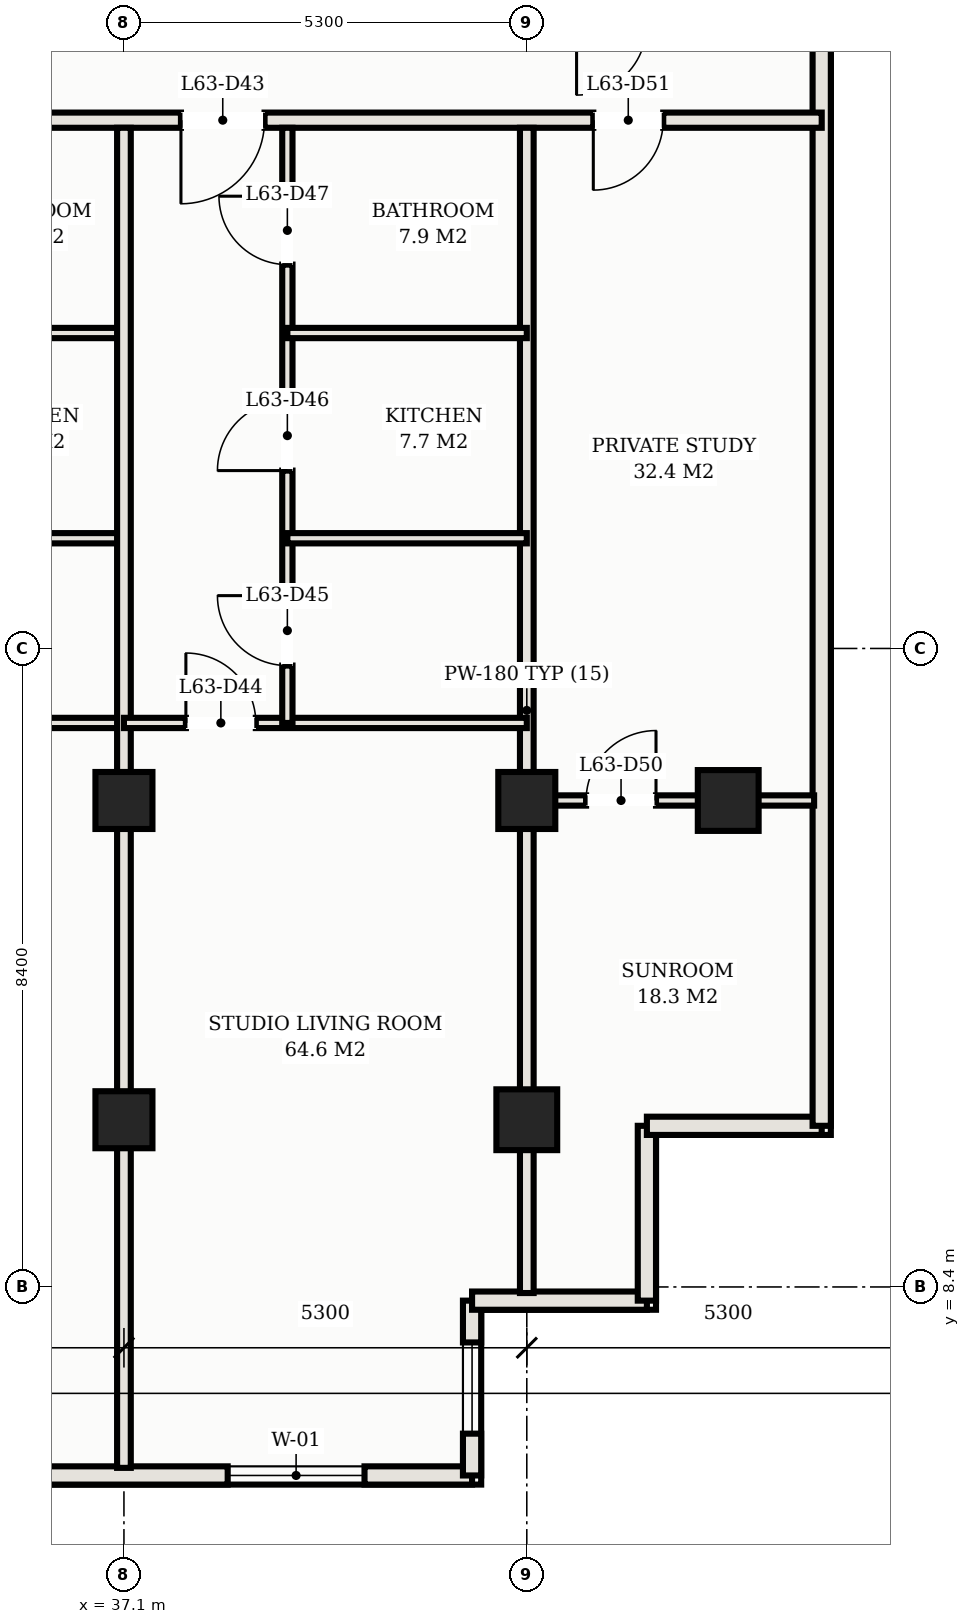
"""IFC4 building model, lengths in metres.
Left out: names, types, materials, properties, quantities, classifications, styles, units other than length and angle.
Written with IfcOpenShell. Run it as: python <this file> out.ifc"""

import sys

from ifc_helpers import new_model, si_unit, direction, frame, frame_2d, origin, origin_2d, place, context, subcontext, project, spatial, rectangle, hollow_rectangle, extrude, element, fill, save


model = new_model("IFC4")
c1 = context("Model", 3, precision=1e-05, world=origin(), true_north=direction((0.0, 1.0)))
c2 = subcontext(c1, "Body", "Model", "MODEL_VIEW")
j1 = project(units=[si_unit("LENGTHUNIT", "METRE"), si_unit("PLANEANGLEUNIT", "RADIAN")], contexts=[c1])
p1 = place(None, origin())
s1 = spatial("IfcSite", under=j1, at=p1, CompositionType="ELEMENT")
p2 = place(p1, origin())
s2 = spatial("IfcBuilding", under=s1, at=p2, CompositionType="ELEMENT")
p3 = place(p2, frame((0.0, 0.0, 229.7)))
s3 = spatial("IfcBuildingStorey", under=s2, at=p3, CompositionType="ELEMENT", Elevation=229.7)
for number, where, z_axis, x_axis in (
    (1, (37.1, 14.8, 0.0), (0.0, 0.0, 1.0), (1.0, 0.0, 0.0)),
    (2, (37.1, 10.6, 0.0), (0.0, 0.0, 1.0), (1.0, 0.0, 0.0)),
    (3, (42.4, 14.8, 0.0), (0.0, 0.0, 1.0), (1.0, 0.0, 0.0)),
):
    element("IfcColumn", number, at=place(p3, frame(where, z_axis=z_axis, x_axis=x_axis)), inside=s3, PredefinedType="COLUMN", context=c2, shape_type="SweptSolid", body=[
        extrude(hollow_rectangle(XDim=0.75, YDim=0.75, WallThickness=0.025, at=origin_2d()), origin(), (0.0, 0.0, 1.0), 3.3),
    ])
p4 = place(p3, frame((42.4, 10.6, 0.0), z_axis=(0.0, 0.0, 1.0), x_axis=(1.0, 0.0, 0.0)))
e4 = element("IfcColumn", 4, at=p4, inside=s3, PredefinedType="COLUMN", context=c2, shape_type="SweptSolid", body=[
    extrude(hollow_rectangle(XDim=0.8, YDim=0.8, WallThickness=0.028, at=origin_2d()), origin(), (0.0, 0.0, 1.0), 3.3),
])
p5 = place(p3, frame((45.05, 14.8, 0.0), z_axis=(0.0, 0.0, 1.0), x_axis=(1.0, 0.0, 0.0)))
e5 = element("IfcColumn", 5, at=p5, inside=s3, PredefinedType="COLUMN", context=c2, shape_type="SweptSolid", body=[
    extrude(hollow_rectangle(XDim=0.8, YDim=0.8, WallThickness=0.028, at=origin_2d()), origin(), (0.0, 0.0, 1.0), 3.264),
])
p6 = place(p3, frame((33.556, 5.92, 0.0), z_axis=(0.0, 0.0, 1.0), x_axis=(1.0, 0.0, 0.0)))
e6 = element("IfcWall", 6, at=p6, inside=s3, PredefinedType="SOLIDWALL", context=c2, shape_type="SweptSolid", body=[
    extrude(rectangle(XDim=8.124, YDim=0.24, at=frame_2d((4.062, 0.0))), origin(), (0.0, 0.0, 1.0), 3.11),
])
p7 = place(p6, frame((4.909, 0.0, 0.75)))
e7 = element("IfcOpeningElement", 7, at=p7, cuts=e6, PredefinedType="OPENING", context=c2, shape_type="SweptSolid", body=[
    extrude(rectangle(XDim=1.8, YDim=1.7, at=frame_2d((0.9, 0.85))), frame((0.0, 0.13, 0.0), z_axis=(0.0, -1.0, 0.0), x_axis=(1.0, 0.0, 0.0)), (0.0, 0.0, 1.0), 0.26),
])
p8 = place(p6, frame((1.197, 0.0, 0.75)))
e8 = element("IfcOpeningElement", 8, at=p8, cuts=e6, PredefinedType="OPENING", context=c2, shape_type="SweptSolid", body=[
    extrude(rectangle(XDim=1.2, YDim=1.5, at=frame_2d((0.6, 0.75))), frame((0.0, 0.13, 0.0), z_axis=(0.0, -1.0, 0.0), x_axis=(1.0, 0.0, 0.0)), (0.0, 0.0, 1.0), 0.26),
])
p9 = place(p3, frame((41.68, 5.92, 0.0), z_axis=(0.0, 0.0, 1.0), x_axis=(0.0, 1.0, 0.0)))
e9 = element("IfcWall", 9, at=p9, inside=s3, PredefinedType="SOLIDWALL", context=c2, shape_type="SweptSolid", body=[
    extrude(rectangle(XDim=2.3, YDim=0.24, at=frame_2d((1.15, 0.0))), origin(), (0.0, 0.0, 1.0), 3.11),
])
p10 = place(p9, frame((0.55, 0.0, 0.75)))
e10 = element("IfcOpeningElement", 10, at=p10, cuts=e9, PredefinedType="OPENING", context=c2, shape_type="SweptSolid", body=[
    extrude(rectangle(XDim=1.2, YDim=1.5, at=frame_2d((0.6, 0.75))), frame((0.0, 0.13, 0.0), z_axis=(0.0, -1.0, 0.0), x_axis=(1.0, 0.0, 0.0)), (0.0, 0.0, 1.0), 0.26),
])
for number, where, z_axis, x_axis in (
    (11, (41.68, 8.22, 0.0), (0.0, 0.0, 1.0), (1.0, 0.0, 0.0)),
    (12, (43.98, 8.22, 0.0), (0.0, 0.0, 1.0), (0.0, 1.0, 0.0)),
    (13, (43.98, 10.52, 0.0), (0.0, 0.0, 1.0), (1.0, 0.0, 0.0)),
):
    element("IfcWall", number, at=place(p3, frame(where, z_axis=z_axis, x_axis=x_axis)), inside=s3, PredefinedType="SOLIDWALL", context=c2, shape_type="SweptSolid", body=[
        extrude(rectangle(XDim=2.3, YDim=0.24, at=frame_2d((1.15, 0.0))), origin(), (0.0, 0.0, 1.0), 3.11),
    ])
p11 = place(p3, frame((46.28, 10.52, 0.0), z_axis=(0.0, 0.0, 1.0), x_axis=(0.0, 1.0, 0.0)))
e14 = element("IfcWall", 14, at=p11, inside=s3, PredefinedType="SOLIDWALL", context=c2, shape_type="SweptSolid", body=[
    extrude(rectangle(XDim=26.41, YDim=0.24, at=frame_2d((13.205, 0.0))), origin(), (0.0, 0.0, 1.0), 3.11),
])
p12 = place(p11, frame((17.48, 0.0, 0.0)))
e15 = element("IfcOpeningElement", 15, at=p12, cuts=e14, PredefinedType="OPENING", context=c2, shape_type="SweptSolid", body=[
    extrude(rectangle(XDim=1.8, YDim=2.2, at=frame_2d((0.9, 1.1))), frame((0.0, 0.13, 0.0), z_axis=(0.0, -1.0, 0.0), x_axis=(1.0, 0.0, 0.0)), (0.0, 0.0, 1.0), 0.26),
])
p13 = place(p3, frame((6.72, 23.75, 0.0), z_axis=(0.0, 0.0, 1.0), x_axis=(1.0, 0.0, 0.0)))
e16 = element("IfcWall", 16, at=p13, inside=s3, PredefinedType="PARTITIONING", context=c2, shape_type="SweptSolid", body=[
    extrude(rectangle(XDim=39.56, YDim=0.2, at=frame_2d((19.78, 0.0))), origin(), (0.0, 0.0, 1.0), 2.43),
])
p14 = place(p13, frame((4.63, 0.0, 0.0)))
e17 = element("IfcOpeningElement", 17, at=p14, cuts=e16, PredefinedType="OPENING", context=c2, shape_type="SweptSolid", body=[
    extrude(rectangle(XDim=1.1, YDim=2.25, at=frame_2d((0.55, 1.125))), frame((0.0, 0.11, 0.0), z_axis=(0.0, -1.0, 0.0), x_axis=(1.0, 0.0, 0.0)), (0.0, 0.0, 1.0), 0.22),
])
p15 = place(p13, frame((9.93, 0.0, 0.0)))
e18 = element("IfcOpeningElement", 18, at=p15, cuts=e16, PredefinedType="OPENING", context=c2, shape_type="SweptSolid", body=[
    extrude(rectangle(XDim=1.1, YDim=2.25, at=frame_2d((0.55, 1.125))), frame((0.0, 0.11, 0.0), z_axis=(0.0, -1.0, 0.0), x_axis=(1.0, 0.0, 0.0)), (0.0, 0.0, 1.0), 0.22),
])
p16 = place(p13, frame((15.23, 0.0, 0.0)))
e19 = element("IfcOpeningElement", 19, at=p16, cuts=e16, PredefinedType="OPENING", context=c2, shape_type="SweptSolid", body=[
    extrude(rectangle(XDim=1.1, YDim=2.25, at=frame_2d((0.55, 1.125))), frame((0.0, 0.11, 0.0), z_axis=(0.0, -1.0, 0.0), x_axis=(1.0, 0.0, 0.0)), (0.0, 0.0, 1.0), 0.22),
])
p17 = place(p13, frame((20.73, 0.0, 0.0)))
e20 = element("IfcOpeningElement", 20, at=p17, cuts=e16, PredefinedType="OPENING", context=c2, shape_type="SweptSolid", body=[
    extrude(rectangle(XDim=1.1, YDim=2.25, at=frame_2d((0.55, 1.125))), frame((0.0, 0.11, 0.0), z_axis=(0.0, -1.0, 0.0), x_axis=(1.0, 0.0, 0.0)), (0.0, 0.0, 1.0), 0.22),
])
p18 = place(p13, frame((25.83, 0.0, 0.0)))
e21 = element("IfcOpeningElement", 21, at=p18, cuts=e16, PredefinedType="OPENING", context=c2, shape_type="SweptSolid", body=[
    extrude(rectangle(XDim=1.1, YDim=2.25, at=frame_2d((0.55, 1.125))), frame((0.0, 0.11, 0.0), z_axis=(0.0, -1.0, 0.0), x_axis=(1.0, 0.0, 0.0)), (0.0, 0.0, 1.0), 0.22),
])
p19 = place(p13, frame((31.13, 0.0, 0.0)))
e22 = element("IfcOpeningElement", 22, at=p19, cuts=e16, PredefinedType="OPENING", context=c2, shape_type="SweptSolid", body=[
    extrude(rectangle(XDim=1.1, YDim=2.25, at=frame_2d((0.55, 1.125))), frame((0.0, 0.11, 0.0), z_axis=(0.0, -1.0, 0.0), x_axis=(1.0, 0.0, 0.0)), (0.0, 0.0, 1.0), 0.22),
])
p20 = place(p13, frame((2.085, 0.0, 0.0)))
e23 = element("IfcOpeningElement", 23, at=p20, cuts=e16, PredefinedType="OPENING", context=c2, shape_type="SweptSolid", body=[
    extrude(rectangle(XDim=0.92, YDim=2.15, at=frame_2d((0.46, 1.075))), frame((0.0, 0.11, 0.0), z_axis=(0.0, -1.0, 0.0), x_axis=(1.0, 0.0, 0.0)), (0.0, 0.0, 1.0), 0.22),
])
p21 = place(p13, frame((36.555, 0.0, 0.0)))
e24 = element("IfcOpeningElement", 24, at=p21, cuts=e16, PredefinedType="OPENING", context=c2, shape_type="SweptSolid", body=[
    extrude(rectangle(XDim=0.92, YDim=2.15, at=frame_2d((0.46, 1.075))), frame((0.0, 0.11, 0.0), z_axis=(0.0, -1.0, 0.0), x_axis=(1.0, 0.0, 0.0)), (0.0, 0.0, 1.0), 0.22),
])
p22 = place(p3, frame((42.4, 8.32, 0.0), z_axis=(0.0, 0.0, 1.0), x_axis=(0.0, 1.0, 0.0)))
e25 = element("IfcWall", 25, at=p22, inside=s3, PredefinedType="PARTITIONING", context=c2, shape_type="SweptSolid", body=[
    extrude(rectangle(XDim=15.33, YDim=0.18, at=frame_2d((7.665, 0.0))), origin(), (0.0, 0.0, 1.0), 2.43),
])
p23 = place(p3, frame((31.8, 15.82, 0.0), z_axis=(0.0, 0.0, 1.0), x_axis=(1.0, 0.0, 0.0)))
e26 = element("IfcWall", 26, at=p23, inside=s3, PredefinedType="PARTITIONING", context=c2, shape_type="SweptSolid", body=[
    extrude(rectangle(XDim=5.3, YDim=0.135, at=frame_2d((2.65, 0.0))), origin(), (0.0, 0.0, 1.0), 2.43),
])
p24 = place(p23, frame((0.815, 0.0, 0.0)))
e27 = element("IfcOpeningElement", 27, at=p24, cuts=e26, PredefinedType="OPENING", context=c2, shape_type="SweptSolid", body=[
    extrude(rectangle(XDim=0.92, YDim=2.15, at=frame_2d((0.46, 1.075))), frame((0.0, 0.078, 0.0), z_axis=(0.0, -1.0, 0.0), x_axis=(1.0, 0.0, 0.0)), (0.0, 0.0, 1.0), 0.155),
])
for number, where, z_axis, x_axis in (
    (28, (33.95, 18.25, 0.0), (0.0, 0.0, 1.0), (1.0, 0.0, 0.0)),
    (29, (33.95, 20.95, 0.0), (0.0, 0.0, 1.0), (1.0, 0.0, 0.0)),
):
    element("IfcWall", number, at=place(p3, frame(where, z_axis=z_axis, x_axis=x_axis)), inside=s3, PredefinedType="PARTITIONING", context=c2, shape_type="SweptSolid", body=[
        extrude(rectangle(XDim=3.15, YDim=0.135, at=frame_2d((1.575, 0.0))), origin(), (0.0, 0.0, 1.0), 2.43),
    ])
p25 = place(p3, frame((37.1, 6.02, 0.0), z_axis=(0.0, 0.0, 1.0), x_axis=(0.0, 1.0, 0.0)))
e30 = element("IfcWall", 30, at=p25, inside=s3, PredefinedType="PARTITIONING", context=c2, shape_type="SweptSolid", body=[
    extrude(rectangle(XDim=17.63, YDim=0.18, at=frame_2d((8.815, 0.0))), origin(), (0.0, 0.0, 1.0), 2.43),
])
p26 = place(p3, frame((37.1, 15.82, 0.0), z_axis=(0.0, 0.0, 1.0), x_axis=(1.0, 0.0, 0.0)))
e31 = element("IfcWall", 31, at=p26, inside=s3, PredefinedType="PARTITIONING", context=c2, shape_type="SweptSolid", body=[
    extrude(rectangle(XDim=5.3, YDim=0.135, at=frame_2d((2.65, 0.0))), origin(), (0.0, 0.0, 1.0), 2.43),
])
p27 = place(p26, frame((0.815, 0.0, 0.0)))
e32 = element("IfcOpeningElement", 32, at=p27, cuts=e31, PredefinedType="OPENING", context=c2, shape_type="SweptSolid", body=[
    extrude(rectangle(XDim=0.92, YDim=2.15, at=frame_2d((0.46, 1.075))), frame((0.0, 0.078, 0.0), z_axis=(0.0, -1.0, 0.0), x_axis=(1.0, 0.0, 0.0)), (0.0, 0.0, 1.0), 0.155),
])
p28 = place(p3, frame((39.25, 15.82, 0.0), z_axis=(0.0, 0.0, 1.0), x_axis=(0.0, 1.0, 0.0)))
e33 = element("IfcWall", 33, at=p28, inside=s3, PredefinedType="PARTITIONING", context=c2, shape_type="SweptSolid", body=[
    extrude(rectangle(XDim=7.83, YDim=0.135, at=frame_2d((3.915, 0.0))), origin(), (0.0, 0.0, 1.0), 2.43),
])
p29 = place(p28, frame((0.755, 0.0, 0.0)))
e34 = element("IfcOpeningElement", 34, at=p29, cuts=e33, PredefinedType="OPENING", context=c2, shape_type="SweptSolid", body=[
    extrude(rectangle(XDim=0.92, YDim=2.15, at=frame_2d((0.46, 1.075))), frame((0.0, 0.078, 0.0), z_axis=(0.0, -1.0, 0.0), x_axis=(1.0, 0.0, 0.0)), (0.0, 0.0, 1.0), 0.155),
])
p30 = place(p28, frame((3.32, 0.0, 0.0)))
e35 = element("IfcOpeningElement", 35, at=p30, cuts=e33, PredefinedType="OPENING", context=c2, shape_type="SweptSolid", body=[
    extrude(rectangle(XDim=0.92, YDim=2.15, at=frame_2d((0.46, 1.075))), frame((0.0, 0.078, 0.0), z_axis=(0.0, -1.0, 0.0), x_axis=(1.0, 0.0, 0.0)), (0.0, 0.0, 1.0), 0.155),
])
p31 = place(p28, frame((6.03, 0.0, 0.0)))
e36 = element("IfcOpeningElement", 36, at=p31, cuts=e33, PredefinedType="OPENING", context=c2, shape_type="SweptSolid", body=[
    extrude(rectangle(XDim=0.9, YDim=2.15, at=frame_2d((0.45, 1.075))), frame((0.0, 0.078, 0.0), z_axis=(0.0, -1.0, 0.0), x_axis=(1.0, 0.0, 0.0)), (0.0, 0.0, 1.0), 0.155),
])
for number, where, z_axis, x_axis in (
    (37, (39.25, 18.25, 0.0), (0.0, 0.0, 1.0), (1.0, 0.0, 0.0)),
    (38, (39.25, 20.95, 0.0), (0.0, 0.0, 1.0), (1.0, 0.0, 0.0)),
):
    element("IfcWall", number, at=place(p3, frame(where, z_axis=z_axis, x_axis=x_axis)), inside=s3, PredefinedType="PARTITIONING", context=c2, shape_type="SweptSolid", body=[
        extrude(rectangle(XDim=3.15, YDim=0.135, at=frame_2d((1.575, 0.0))), origin(), (0.0, 0.0, 1.0), 2.43),
    ])
p32 = place(p3, frame((42.4, 14.8, 0.0), z_axis=(0.0, 0.0, 1.0), x_axis=(1.0, 0.0, 0.0)))
e39 = element("IfcWall", 39, at=p32, inside=s3, PredefinedType="PARTITIONING", context=c2, shape_type="SweptSolid", body=[
    extrude(rectangle(XDim=3.78, YDim=0.135, at=frame_2d((1.89, 0.0))), origin(), (0.0, 0.0, 1.0), 2.43),
])
p33 = place(p32, frame((0.78, 0.0, 0.0)))
e40 = element("IfcOpeningElement", 40, at=p33, cuts=e39, PredefinedType="OPENING", context=c2, shape_type="SweptSolid", body=[
    extrude(rectangle(XDim=0.92, YDim=2.15, at=frame_2d((0.46, 1.075))), frame((0.0, 0.078, 0.0), z_axis=(0.0, -1.0, 0.0), x_axis=(1.0, 0.0, 0.0)), (0.0, 0.0, 1.0), 0.155),
])
p34 = place(p7, origin())
e41 = element("IfcWindow", 41, at=p34, inside=s3, PartitioningType="SINGLE_PANEL", PredefinedType="WINDOW", context=c2, shape_type="SweptSolid", body=[
    extrude(rectangle(XDim=1.8, YDim=1.7, at=frame_2d((0.9, 0.85))), frame((0.0, 0.03, 0.0), z_axis=(0.0, -1.0, 0.0), x_axis=(1.0, 0.0, 0.0)), (0.0, 0.0, 1.0), 0.06),
])
fill(e7, e41)
p35 = place(p10, origin())
e42 = element("IfcWindow", 42, at=p35, inside=s3, PartitioningType="SINGLE_PANEL", PredefinedType="WINDOW", context=c2, shape_type="SweptSolid", body=[
    extrude(rectangle(XDim=1.2, YDim=1.5, at=frame_2d((0.6, 0.75))), frame((0.0, 0.03, 0.0), z_axis=(0.0, -1.0, 0.0), x_axis=(1.0, 0.0, 0.0)), (0.0, 0.0, 1.0), 0.06),
])
fill(e10, e42)
p36 = place(p19, frame((1.1, 0.0, 0.0), z_axis=(0.0, 0.0, 1.0), x_axis=(-1.0, 0.0, 0.0)))
e43 = element("IfcDoor", 43, at=p36, inside=s3, OperationType="SINGLE_SWING_RIGHT", PredefinedType="DOOR", context=c2, shape_type="SweptSolid", body=[
    extrude(rectangle(XDim=1.1, YDim=2.25, at=frame_2d((0.55, 1.125))), frame((0.0, 0.025, 0.0), z_axis=(0.0, -1.0, 0.0), x_axis=(1.0, 0.0, 0.0)), (0.0, 0.0, 1.0), 0.05),
])
fill(e22, e43)
p37 = place(p27, origin())
e44 = element("IfcDoor", 44, at=p37, inside=s3, OperationType="SINGLE_SWING_LEFT", PredefinedType="DOOR", context=c2, shape_type="SweptSolid", body=[
    extrude(rectangle(XDim=0.92, YDim=2.15, at=frame_2d((0.46, 1.075))), frame((0.0, 0.025, 0.0), z_axis=(0.0, -1.0, 0.0), x_axis=(1.0, 0.0, 0.0)), (0.0, 0.0, 1.0), 0.05),
])
fill(e32, e44)
p38 = place(p29, origin())
e45 = element("IfcDoor", 45, at=p38, inside=s3, OperationType="SINGLE_SWING_RIGHT", PredefinedType="DOOR", context=c2, shape_type="SweptSolid", body=[
    extrude(rectangle(XDim=0.92, YDim=2.15, at=frame_2d((0.46, 1.075))), frame((0.0, 0.025, 0.0), z_axis=(0.0, -1.0, 0.0), x_axis=(1.0, 0.0, 0.0)), (0.0, 0.0, 1.0), 0.05),
])
fill(e34, e45)
p39 = place(p30, origin())
e46 = element("IfcDoor", 46, at=p39, inside=s3, OperationType="SINGLE_SWING_LEFT", PredefinedType="DOOR", context=c2, shape_type="SweptSolid", body=[
    extrude(rectangle(XDim=0.92, YDim=2.15, at=frame_2d((0.46, 1.075))), frame((0.0, 0.025, 0.0), z_axis=(0.0, -1.0, 0.0), x_axis=(1.0, 0.0, 0.0)), (0.0, 0.0, 1.0), 0.05),
])
fill(e35, e46)
p40 = place(p31, origin())
e47 = element("IfcDoor", 47, at=p40, inside=s3, OperationType="SINGLE_SWING_RIGHT", PredefinedType="DOOR", context=c2, shape_type="SweptSolid", body=[
    extrude(rectangle(XDim=0.9, YDim=2.15, at=frame_2d((0.45, 1.075))), frame((0.0, 0.025, 0.0), z_axis=(0.0, -1.0, 0.0), x_axis=(1.0, 0.0, 0.0)), (0.0, 0.0, 1.0), 0.05),
])
fill(e36, e47)
p41 = place(p33, origin())
e48 = element("IfcDoor", 48, at=p41, inside=s3, OperationType="SINGLE_SWING_RIGHT", PredefinedType="DOOR", context=c2, shape_type="SweptSolid", body=[
    extrude(rectangle(XDim=0.92, YDim=2.15, at=frame_2d((0.46, 1.075))), frame((0.0, 0.025, 0.0), z_axis=(0.0, -1.0, 0.0), x_axis=(1.0, 0.0, 0.0)), (0.0, 0.0, 1.0), 0.05),
])
fill(e40, e48)
p42 = place(p21, frame((0.92, 0.0, 0.0), z_axis=(0.0, 0.0, 1.0), x_axis=(-1.0, 0.0, 0.0)))
e49 = element("IfcDoor", 49, at=p42, inside=s3, OperationType="SINGLE_SWING_RIGHT", PredefinedType="DOOR", context=c2, shape_type="SweptSolid", body=[
    extrude(rectangle(XDim=0.92, YDim=2.15, at=frame_2d((0.46, 1.075))), frame((0.0, 0.025, 0.0), z_axis=(0.0, -1.0, 0.0), x_axis=(1.0, 0.0, 0.0)), (0.0, 0.0, 1.0), 0.05),
])
fill(e24, e49)
save(model, sys.argv[1])
